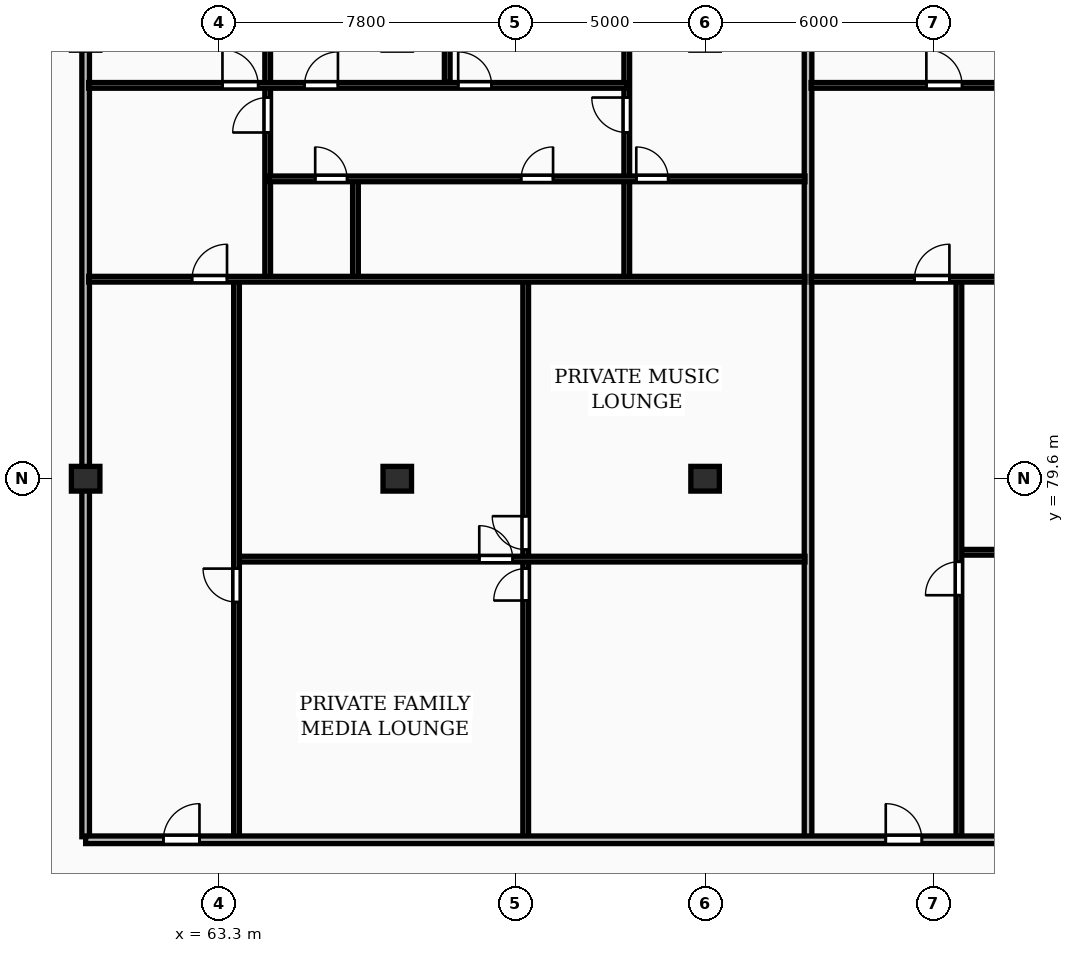
"""IFC4 building model, lengths in metres.
Left out: names, types, materials, properties, quantities, classifications, styles, units other than length and angle.
Written with IfcOpenShell. Run it as: python <this file> out.ifc"""

import sys

from ifc_helpers import new_model, si_unit, direction, frame, frame_2d, origin, origin_2d, place, context, subcontext, project, spatial, rectangle, extrude, element, fill, save


model = new_model("IFC4")
c1 = context("Model", 3, precision=1e-05, world=origin(), true_north=direction((0.0, 1.0)))
c2 = subcontext(c1, "Body", "Model", "MODEL_VIEW")
j1 = project(units=[si_unit("LENGTHUNIT", "METRE"), si_unit("PLANEANGLEUNIT", "RADIAN")], contexts=[c1])
p1 = place(None, origin())
s1 = spatial("IfcSite", under=j1, at=p1, CompositionType="ELEMENT")
p2 = place(p1, origin())
s2 = spatial("IfcBuilding", under=s1, at=p2, CompositionType="ELEMENT")
p3 = place(p2, frame((0.0, 0.0, 256.25)))
s3 = spatial("IfcBuildingStorey", under=s2, at=p3, CompositionType="ELEMENT", Elevation=256.25)
for number, where, z_axis, x_axis in (
    (1, (59.8, 79.6, 0.0), (0.0, 0.0, 1.0), (1.0, 0.0, 0.0)),
    (2, (68.0, 79.6, 0.0), (0.0, 0.0, 1.0), (1.0, 0.0, 0.0)),
    (3, (76.1, 79.6, 0.0), (0.0, 0.0, 1.0), (1.0, 0.0, 0.0)),
):
    element("IfcColumn", number, at=place(p3, frame(where, z_axis=z_axis, x_axis=x_axis)), inside=s3, PredefinedType="COLUMN", context=c2, shape_type="SweptSolid", body=[
        extrude(rectangle(XDim=0.75, YDim=0.65, at=origin_2d()), origin(), (0.0, 0.0, 1.0), 3.45),
    ])
p4 = place(p3, frame((59.8, 70.18, 0.0), z_axis=(0.0, 0.0, 1.0), x_axis=(0.0, 1.0, 0.0)))
e4 = element("IfcWall", 4, at=p4, inside=s3, PredefinedType="PARTITIONING", context=c2, shape_type="SweptSolid", body=[
    extrude(rectangle(XDim=24.32, YDim=0.2, at=frame_2d((12.16, 0.0))), origin(), (0.0, 0.0, 1.0), 2.477),
])
p5 = place(p3, frame((78.809, 70.18, 0.0), z_axis=(0.0, 0.0, 1.0), x_axis=(0.0, 1.0, 0.0)))
e5 = element("IfcWall", 5, at=p5, inside=s3, PredefinedType="PARTITIONING", context=c2, shape_type="SweptSolid", body=[
    extrude(rectangle(XDim=24.32, YDim=0.2, at=frame_2d((12.16, 0.0))), origin(), (0.0, 0.0, 1.0), 3.17),
])
p6 = place(p3, frame((71.379, 70.16, 0.0), z_axis=(0.0, 0.0, 1.0), x_axis=(0.0, 1.0, 0.0)))
e6 = element("IfcWall", 6, at=p6, inside=s3, PredefinedType="PARTITIONING", context=c2, shape_type="SweptSolid", body=[
    extrude(rectangle(XDim=14.65, YDim=0.15, at=frame_2d((7.325, 0.0))), origin(), (0.0, 0.0, 1.0), 3.17),
])
p7 = place(p6, frame((6.235, 0.0, 0.0)))
e7 = element("IfcOpeningElement", 7, at=p7, cuts=e6, PredefinedType="OPENING", context=c2, shape_type="SweptSolid", body=[
    extrude(rectangle(XDim=0.84, YDim=2.04, at=frame_2d((0.42, 1.02))), frame((0.0, 0.085, 0.0), z_axis=(0.0, -1.0, 0.0), x_axis=(1.0, 0.0, 0.0)), (0.0, 0.0, 1.0), 0.17),
])
p8 = place(p6, frame((7.575, 0.0, 0.0)))
e8 = element("IfcOpeningElement", 8, at=p8, cuts=e6, PredefinedType="OPENING", context=c2, shape_type="SweptSolid", body=[
    extrude(rectangle(XDim=0.88, YDim=2.06, at=frame_2d((0.44, 1.03))), frame((0.0, 0.085, 0.0), z_axis=(0.0, -1.0, 0.0), x_axis=(1.0, 0.0, 0.0)), (0.0, 0.0, 1.0), 0.17),
])
p9 = place(p3, frame((63.83, 77.485, 0.0), z_axis=(0.0, 0.0, 1.0), x_axis=(1.0, 0.0, 0.0)))
e9 = element("IfcWall", 9, at=p9, inside=s3, PredefinedType="PARTITIONING", context=c2, shape_type="SweptSolid", body=[
    extrude(rectangle(XDim=14.899, YDim=0.15, at=frame_2d((7.449, 0.0))), origin(), (0.0, 0.0, 1.0), 3.17),
])
p10 = place(p9, frame((6.327, 0.0, 0.0)))
e10 = element("IfcOpeningElement", 10, at=p10, cuts=e9, PredefinedType="OPENING", context=c2, shape_type="SweptSolid", body=[
    extrude(rectangle(XDim=0.88, YDim=2.06, at=frame_2d((0.44, 1.03))), frame((0.0, 0.085, 0.0), z_axis=(0.0, -1.0, 0.0), x_axis=(1.0, 0.0, 0.0)), (0.0, 0.0, 1.0), 0.17),
])
p11 = place(p3, frame((63.77, 70.16, 0.0), z_axis=(0.0, 0.0, 1.0), x_axis=(0.0, 1.0, 0.0)))
e11 = element("IfcWall", 11, at=p11, inside=s3, PredefinedType="PARTITIONING", context=c2, shape_type="SweptSolid", body=[
    extrude(rectangle(XDim=14.65, YDim=0.15, at=frame_2d((7.325, 0.0))), origin(), (0.0, 0.0, 1.0), 3.17),
])
p12 = place(p11, frame((6.195, 0.0, 0.0)))
e12 = element("IfcOpeningElement", 12, at=p12, cuts=e11, PredefinedType="OPENING", context=c2, shape_type="SweptSolid", body=[
    extrude(rectangle(XDim=0.88, YDim=2.06, at=frame_2d((0.44, 1.03))), frame((0.0, 0.085, 0.0), z_axis=(0.0, -1.0, 0.0), x_axis=(1.0, 0.0, 0.0)), (0.0, 0.0, 1.0), 0.17),
])
p13 = place(p3, frame((66.9, 84.89, 0.0), z_axis=(0.0, 0.0, 1.0), x_axis=(0.0, 1.0, 0.0)))
e13 = element("IfcWall", 13, at=p13, inside=s3, PredefinedType="PARTITIONING", context=c2, shape_type="SweptSolid", body=[
    extrude(rectangle(XDim=2.58, YDim=0.15, at=frame_2d((1.29, 0.0))), origin(), (0.0, 0.0, 1.0), 3.17),
])
p14 = place(p3, frame((69.314, 90.03, 0.0), z_axis=(0.0, 0.0, 1.0), x_axis=(0.0, 1.0, 0.0)))
e14 = element("IfcWall", 14, at=p14, inside=s3, PredefinedType="PARTITIONING", context=c2, shape_type="SweptSolid", body=[
    extrude(rectangle(XDim=4.47, YDim=0.15, at=frame_2d((2.235, 0.0))), origin(), (0.0, 0.0, 1.0), 3.17),
])
p15 = place(p3, frame((64.59, 84.89, 0.0), z_axis=(0.0, 0.0, 1.0), x_axis=(0.0, 1.0, 0.0)))
e15 = element("IfcWall", 15, at=p15, inside=s3, PredefinedType="PARTITIONING", context=c2, shape_type="SweptSolid", body=[
    extrude(rectangle(XDim=9.61, YDim=0.15, at=frame_2d((4.805, 0.0))), origin(), (0.0, 0.0, 1.0), 3.17),
])
p16 = place(p15, frame((3.82, 0.0, 0.0)))
e16 = element("IfcOpeningElement", 16, at=p16, cuts=e15, PredefinedType="OPENING", context=c2, shape_type="SweptSolid", body=[
    extrude(rectangle(XDim=0.92, YDim=2.08, at=frame_2d((0.46, 1.04))), frame((0.0, 0.085, 0.0), z_axis=(0.0, -1.0, 0.0), x_axis=(1.0, 0.0, 0.0)), (0.0, 0.0, 1.0), 0.17),
])
p17 = place(p3, frame((74.039, 84.89, 0.0), z_axis=(0.0, 0.0, 1.0), x_axis=(0.0, 1.0, 0.0)))
e17 = element("IfcWall", 17, at=p17, inside=s3, PredefinedType="PARTITIONING", context=c2, shape_type="SweptSolid", body=[
    extrude(rectangle(XDim=2.58, YDim=0.15, at=frame_2d((1.29, 0.0))), origin(), (0.0, 0.0, 1.0), 3.17),
])
p18 = place(p3, frame((74.039, 87.51, 0.0), z_axis=(0.0, 0.0, 1.0), x_axis=(0.0, 1.0, 0.0)))
e18 = element("IfcWall", 18, at=p18, inside=s3, PredefinedType="PARTITIONING", context=c2, shape_type="SweptSolid", body=[
    extrude(rectangle(XDim=6.99, YDim=0.15, at=frame_2d((3.495, 0.0))), origin(), (0.0, 0.0, 1.0), 3.17),
])
p19 = place(p18, frame((1.2, 0.0, 0.0)))
e19 = element("IfcOpeningElement", 19, at=p19, cuts=e18, PredefinedType="OPENING", context=c2, shape_type="SweptSolid", body=[
    extrude(rectangle(XDim=0.92, YDim=2.08, at=frame_2d((0.46, 1.04))), frame((0.0, 0.085, 0.0), z_axis=(0.0, -1.0, 0.0), x_axis=(1.0, 0.0, 0.0)), (0.0, 0.0, 1.0), 0.17),
])
p20 = place(p3, frame((64.63, 87.49, 0.0), z_axis=(0.0, 0.0, 1.0), x_axis=(1.0, 0.0, 0.0)))
e20 = element("IfcWall", 20, at=p20, inside=s3, PredefinedType="PARTITIONING", context=c2, shape_type="SweptSolid", body=[
    extrude(rectangle(XDim=14.099, YDim=0.15, at=frame_2d((7.05, 0.0))), origin(), (0.0, 0.0, 1.0), 3.17),
])
p21 = place(p20, frame((1.21, 0.0, 0.0)))
e21 = element("IfcOpeningElement", 21, at=p21, cuts=e20, PredefinedType="OPENING", context=c2, shape_type="SweptSolid", body=[
    extrude(rectangle(XDim=0.84, YDim=2.04, at=frame_2d((0.42, 1.02))), frame((0.0, 0.085, 0.0), z_axis=(0.0, -1.0, 0.0), x_axis=(1.0, 0.0, 0.0)), (0.0, 0.0, 1.0), 0.17),
])
p22 = place(p20, frame((6.63, 0.0, 0.0)))
e22 = element("IfcOpeningElement", 22, at=p22, cuts=e20, PredefinedType="OPENING", context=c2, shape_type="SweptSolid", body=[
    extrude(rectangle(XDim=0.84, YDim=2.04, at=frame_2d((0.42, 1.02))), frame((0.0, 0.085, 0.0), z_axis=(0.0, -1.0, 0.0), x_axis=(1.0, 0.0, 0.0)), (0.0, 0.0, 1.0), 0.17),
])
p23 = place(p20, frame((9.659, 0.0, 0.0)))
e23 = element("IfcOpeningElement", 23, at=p23, cuts=e20, PredefinedType="OPENING", context=c2, shape_type="SweptSolid", body=[
    extrude(rectangle(XDim=0.84, YDim=2.04, at=frame_2d((0.42, 1.02))), frame((0.0, 0.085, 0.0), z_axis=(0.0, -1.0, 0.0), x_axis=(1.0, 0.0, 0.0)), (0.0, 0.0, 1.0), 0.17),
])
p24 = place(p3, frame((59.88, 84.85, 0.0), z_axis=(0.0, 0.0, 1.0), x_axis=(1.0, 0.0, 0.0)))
e24 = element("IfcWall", 24, at=p24, inside=s3, PredefinedType="PARTITIONING", context=c2, shape_type="SweptSolid", body=[
    extrude(rectangle(XDim=18.849, YDim=0.15, at=frame_2d((9.425, 0.0))), origin(), (0.0, 0.0, 1.0), 3.17),
])
p25 = place(p24, frame((2.72, 0.0, 0.0)))
e25 = element("IfcOpeningElement", 25, at=p25, cuts=e24, PredefinedType="OPENING", context=c2, shape_type="SweptSolid", body=[
    extrude(rectangle(XDim=0.92, YDim=2.08, at=frame_2d((0.46, 1.04))), frame((0.0, 0.085, 0.0), z_axis=(0.0, -1.0, 0.0), x_axis=(1.0, 0.0, 0.0)), (0.0, 0.0, 1.0), 0.17),
])
p26 = place(p3, frame((59.88, 89.95, 0.0), z_axis=(0.0, 0.0, 1.0), x_axis=(1.0, 0.0, 0.0)))
e26 = element("IfcWall", 26, at=p26, inside=s3, PredefinedType="PARTITIONING", context=c2, shape_type="SweptSolid", body=[
    extrude(rectangle(XDim=14.159, YDim=0.15, at=frame_2d((7.08, 0.0))), origin(), (0.0, 0.0, 1.0), 3.17),
])
p27 = place(p26, frame((3.52, 0.0, 0.0)))
e27 = element("IfcOpeningElement", 27, at=p27, cuts=e26, PredefinedType="OPENING", context=c2, shape_type="SweptSolid", body=[
    extrude(rectangle(XDim=0.94, YDim=2.1, at=frame_2d((0.47, 1.05))), frame((0.0, 0.085, 0.0), z_axis=(0.0, -1.0, 0.0), x_axis=(1.0, 0.0, 0.0)), (0.0, 0.0, 1.0), 0.17),
])
p28 = place(p26, frame((5.679, 0.0, 0.0)))
e28 = element("IfcOpeningElement", 28, at=p28, cuts=e26, PredefinedType="OPENING", context=c2, shape_type="SweptSolid", body=[
    extrude(rectangle(XDim=0.88, YDim=2.06, at=frame_2d((0.44, 1.03))), frame((0.0, 0.085, 0.0), z_axis=(0.0, -1.0, 0.0), x_axis=(1.0, 0.0, 0.0)), (0.0, 0.0, 1.0), 0.17),
])
p29 = place(p26, frame((9.723, 0.0, 0.0)))
e29 = element("IfcOpeningElement", 29, at=p29, cuts=e26, PredefinedType="OPENING", context=c2, shape_type="SweptSolid", body=[
    extrude(rectangle(XDim=0.88, YDim=2.06, at=frame_2d((0.44, 1.03))), frame((0.0, 0.085, 0.0), z_axis=(0.0, -1.0, 0.0), x_axis=(1.0, 0.0, 0.0)), (0.0, 0.0, 1.0), 0.17),
])
p30 = place(p3, frame((82.839, 77.665, 0.0), z_axis=(0.0, 0.0, 1.0), x_axis=(1.0, 0.0, 0.0)))
e30 = element("IfcWall", 30, at=p30, inside=s3, PredefinedType="PARTITIONING", context=c2, shape_type="SweptSolid", body=[
    extrude(rectangle(XDim=13.669, YDim=0.15, at=frame_2d((6.835, 0.0))), origin(), (0.0, 0.0, 1.0), 3.17),
])
p31 = place(p30, frame((5.51, 0.0, 0.0)))
e31 = element("IfcOpeningElement", 31, at=p31, cuts=e30, PredefinedType="OPENING", context=c2, shape_type="SweptSolid", body=[
    extrude(rectangle(XDim=0.88, YDim=2.06, at=frame_2d((0.44, 1.03))), frame((0.0, 0.085, 0.0), z_axis=(0.0, -1.0, 0.0), x_axis=(1.0, 0.0, 0.0)), (0.0, 0.0, 1.0), 0.17),
])
p32 = place(p3, frame((82.779, 70.16, 0.0), z_axis=(0.0, 0.0, 1.0), x_axis=(0.0, 1.0, 0.0)))
e32 = element("IfcWall", 32, at=p32, inside=s3, PredefinedType="PARTITIONING", context=c2, shape_type="SweptSolid", body=[
    extrude(rectangle(XDim=14.65, YDim=0.15, at=frame_2d((7.325, 0.0))), origin(), (0.0, 0.0, 1.0), 3.17),
])
p33 = place(p32, frame((6.375, 0.0, 0.0)))
e33 = element("IfcOpeningElement", 33, at=p33, cuts=e32, PredefinedType="OPENING", context=c2, shape_type="SweptSolid", body=[
    extrude(rectangle(XDim=0.88, YDim=2.06, at=frame_2d((0.44, 1.03))), frame((0.0, 0.085, 0.0), z_axis=(0.0, -1.0, 0.0), x_axis=(1.0, 0.0, 0.0)), (0.0, 0.0, 1.0), 0.17),
])
p34 = place(p3, frame((78.889, 84.85, 0.0), z_axis=(0.0, 0.0, 1.0), x_axis=(1.0, 0.0, 0.0)))
e34 = element("IfcWall", 34, at=p34, inside=s3, PredefinedType="PARTITIONING", context=c2, shape_type="SweptSolid", body=[
    extrude(rectangle(XDim=17.619, YDim=0.15, at=frame_2d((8.81, 0.0))), origin(), (0.0, 0.0, 1.0), 3.17),
])
p35 = place(p34, frame((2.72, 0.0, 0.0)))
e35 = element("IfcOpeningElement", 35, at=p35, cuts=e34, PredefinedType="OPENING", context=c2, shape_type="SweptSolid", body=[
    extrude(rectangle(XDim=0.92, YDim=2.08, at=frame_2d((0.46, 1.04))), frame((0.0, 0.085, 0.0), z_axis=(0.0, -1.0, 0.0), x_axis=(1.0, 0.0, 0.0)), (0.0, 0.0, 1.0), 0.17),
])
p36 = place(p3, frame((78.889, 89.95, 0.0), z_axis=(0.0, 0.0, 1.0), x_axis=(1.0, 0.0, 0.0)))
e36 = element("IfcWall", 36, at=p36, inside=s3, PredefinedType="PARTITIONING", context=c2, shape_type="SweptSolid", body=[
    extrude(rectangle(XDim=12.931, YDim=0.15, at=frame_2d((6.465, 0.0))), origin(), (0.0, 0.0, 1.0), 3.17),
])
p37 = place(p36, frame((3.033, 0.0, 0.0)))
e37 = element("IfcOpeningElement", 37, at=p37, cuts=e36, PredefinedType="OPENING", context=c2, shape_type="SweptSolid", body=[
    extrude(rectangle(XDim=0.94, YDim=2.1, at=frame_2d((0.47, 1.05))), frame((0.0, 0.085, 0.0), z_axis=(0.0, -1.0, 0.0), x_axis=(1.0, 0.0, 0.0)), (0.0, 0.0, 1.0), 0.17),
])
p38 = place(p36, frame((7.711, 0.0, 0.0)))
e38 = element("IfcOpeningElement", 38, at=p38, cuts=e36, PredefinedType="OPENING", context=c2, shape_type="SweptSolid", body=[
    extrude(rectangle(XDim=0.88, YDim=2.06, at=frame_2d((0.44, 1.03))), frame((0.0, 0.085, 0.0), z_axis=(0.0, -1.0, 0.0), x_axis=(1.0, 0.0, 0.0)), (0.0, 0.0, 1.0), 0.17),
])
p39 = place(p36, frame((10.431, 0.0, 0.0)))
e39 = element("IfcOpeningElement", 39, at=p39, cuts=e36, PredefinedType="OPENING", context=c2, shape_type="SweptSolid", body=[
    extrude(rectangle(XDim=0.88, YDim=2.06, at=frame_2d((0.44, 1.03))), frame((0.0, 0.085, 0.0), z_axis=(0.0, -1.0, 0.0), x_axis=(1.0, 0.0, 0.0)), (0.0, 0.0, 1.0), 0.17),
])
p40 = place(p3, frame((59.8, 70.1, 0.0), z_axis=(0.0, 0.0, 1.0), x_axis=(1.0, 0.0, 0.0)))
e40 = element("IfcWall", 40, at=p40, inside=s3, PredefinedType="PARTITIONING", context=c2, shape_type="SweptSolid", body=[
    extrude(rectangle(XDim=68.6, YDim=0.2, at=frame_2d((34.3, 0.0))), origin(), (0.0, 0.0, 1.0), 3.17),
])
p41 = place(p40, frame((2.045, 0.0, 0.0)))
e41 = element("IfcOpeningElement", 41, at=p41, cuts=e40, PredefinedType="OPENING", context=c2, shape_type="SweptSolid", body=[
    extrude(rectangle(XDim=0.95, YDim=2.15, at=frame_2d((0.475, 1.075))), frame((0.0, 0.11, 0.0), z_axis=(0.0, -1.0, 0.0), x_axis=(1.0, 0.0, 0.0)), (0.0, 0.0, 1.0), 0.22),
])
p42 = place(p40, frame((21.054, 0.0, 0.0)))
e42 = element("IfcOpeningElement", 42, at=p42, cuts=e40, PredefinedType="OPENING", context=c2, shape_type="SweptSolid", body=[
    extrude(rectangle(XDim=0.95, YDim=2.15, at=frame_2d((0.475, 1.075))), frame((0.0, 0.11, 0.0), z_axis=(0.0, -1.0, 0.0), x_axis=(1.0, 0.0, 0.0)), (0.0, 0.0, 1.0), 0.22),
])
p43 = place(p40, frame((43.434, 0.0, 0.0)))
e43 = element("IfcOpeningElement", 43, at=p43, cuts=e40, PredefinedType="OPENING", context=c2, shape_type="SweptSolid", body=[
    extrude(rectangle(XDim=1.22, YDim=2.18, at=frame_2d((0.61, 1.09))), frame((0.0, 0.11, 0.0), z_axis=(0.0, -1.0, 0.0), x_axis=(1.0, 0.0, 0.0)), (0.0, 0.0, 1.0), 0.22),
])
p44 = place(p40, frame((59.455, 0.0, 0.0)))
e44 = element("IfcOpeningElement", 44, at=p44, cuts=e40, PredefinedType="OPENING", context=c2, shape_type="SweptSolid", body=[
    extrude(rectangle(XDim=1.22, YDim=2.18, at=frame_2d((0.61, 1.09))), frame((0.0, 0.11, 0.0), z_axis=(0.0, -1.0, 0.0), x_axis=(1.0, 0.0, 0.0)), (0.0, 0.0, 1.0), 0.22),
])
p45 = place(p7, origin())
e45 = element("IfcDoor", 45, at=p45, inside=s3, OperationType="SINGLE_SWING_LEFT", PredefinedType="DOOR", context=c2, shape_type="SweptSolid", body=[
    extrude(rectangle(XDim=0.84, YDim=2.04, at=frame_2d((0.42, 1.02))), frame((0.0, 0.025, 0.0), z_axis=(0.0, -1.0, 0.0), x_axis=(1.0, 0.0, 0.0)), (0.0, 0.0, 1.0), 0.05),
])
fill(e7, e45)
p46 = place(p8, origin())
e46 = element("IfcDoor", 46, at=p46, inside=s3, OperationType="SINGLE_SWING_RIGHT", PredefinedType="DOOR", context=c2, shape_type="SweptSolid", body=[
    extrude(rectangle(XDim=0.88, YDim=2.06, at=frame_2d((0.44, 1.03))), frame((0.0, 0.025, 0.0), z_axis=(0.0, -1.0, 0.0), x_axis=(1.0, 0.0, 0.0)), (0.0, 0.0, 1.0), 0.05),
])
fill(e8, e46)
p47 = place(p10, origin())
e47 = element("IfcDoor", 47, at=p47, inside=s3, OperationType="SINGLE_SWING_LEFT", PredefinedType="DOOR", context=c2, shape_type="SweptSolid", body=[
    extrude(rectangle(XDim=0.88, YDim=2.06, at=frame_2d((0.44, 1.03))), frame((0.0, 0.025, 0.0), z_axis=(0.0, -1.0, 0.0), x_axis=(1.0, 0.0, 0.0)), (0.0, 0.0, 1.0), 0.05),
])
fill(e10, e47)
p48 = place(p12, origin())
e48 = element("IfcDoor", 48, at=p48, inside=s3, OperationType="SINGLE_SWING_RIGHT", PredefinedType="DOOR", context=c2, shape_type="SweptSolid", body=[
    extrude(rectangle(XDim=0.88, YDim=2.06, at=frame_2d((0.44, 1.03))), frame((0.0, 0.025, 0.0), z_axis=(0.0, -1.0, 0.0), x_axis=(1.0, 0.0, 0.0)), (0.0, 0.0, 1.0), 0.05),
])
fill(e12, e48)
p49 = place(p16, origin())
e49 = element("IfcDoor", 49, at=p49, inside=s3, OperationType="SINGLE_SWING_LEFT", PredefinedType="DOOR", context=c2, shape_type="SweptSolid", body=[
    extrude(rectangle(XDim=0.92, YDim=2.08, at=frame_2d((0.46, 1.04))), frame((0.0, 0.025, 0.0), z_axis=(0.0, -1.0, 0.0), x_axis=(1.0, 0.0, 0.0)), (0.0, 0.0, 1.0), 0.05),
])
fill(e16, e49)
p50 = place(p19, origin())
e50 = element("IfcDoor", 50, at=p50, inside=s3, OperationType="SINGLE_SWING_RIGHT", PredefinedType="DOOR", context=c2, shape_type="SweptSolid", body=[
    extrude(rectangle(XDim=0.92, YDim=2.08, at=frame_2d((0.46, 1.04))), frame((0.0, 0.025, 0.0), z_axis=(0.0, -1.0, 0.0), x_axis=(1.0, 0.0, 0.0)), (0.0, 0.0, 1.0), 0.05),
])
fill(e19, e50)
p51 = place(p21, origin())
e51 = element("IfcDoor", 51, at=p51, inside=s3, OperationType="SINGLE_SWING_LEFT", PredefinedType="DOOR", context=c2, shape_type="SweptSolid", body=[
    extrude(rectangle(XDim=0.84, YDim=2.04, at=frame_2d((0.42, 1.02))), frame((0.0, 0.025, 0.0), z_axis=(0.0, -1.0, 0.0), x_axis=(1.0, 0.0, 0.0)), (0.0, 0.0, 1.0), 0.05),
])
fill(e21, e51)
p52 = place(p22, origin())
e52 = element("IfcDoor", 52, at=p52, inside=s3, OperationType="SINGLE_SWING_RIGHT", PredefinedType="DOOR", context=c2, shape_type="SweptSolid", body=[
    extrude(rectangle(XDim=0.84, YDim=2.04, at=frame_2d((0.42, 1.02))), frame((0.0, 0.025, 0.0), z_axis=(0.0, -1.0, 0.0), x_axis=(1.0, 0.0, 0.0)), (0.0, 0.0, 1.0), 0.05),
])
fill(e22, e52)
p53 = place(p23, origin())
e53 = element("IfcDoor", 53, at=p53, inside=s3, OperationType="SINGLE_SWING_LEFT", PredefinedType="DOOR", context=c2, shape_type="SweptSolid", body=[
    extrude(rectangle(XDim=0.84, YDim=2.04, at=frame_2d((0.42, 1.02))), frame((0.0, 0.025, 0.0), z_axis=(0.0, -1.0, 0.0), x_axis=(1.0, 0.0, 0.0)), (0.0, 0.0, 1.0), 0.05),
])
fill(e23, e53)
p54 = place(p25, origin())
e54 = element("IfcDoor", 54, at=p54, inside=s3, OperationType="SINGLE_SWING_RIGHT", PredefinedType="DOOR", context=c2, shape_type="SweptSolid", body=[
    extrude(rectangle(XDim=0.92, YDim=2.08, at=frame_2d((0.46, 1.04))), frame((0.0, 0.025, 0.0), z_axis=(0.0, -1.0, 0.0), x_axis=(1.0, 0.0, 0.0)), (0.0, 0.0, 1.0), 0.05),
])
fill(e25, e54)
p55 = place(p27, origin())
e55 = element("IfcDoor", 55, at=p55, inside=s3, OperationType="SINGLE_SWING_LEFT", PredefinedType="DOOR", context=c2, shape_type="SweptSolid", body=[
    extrude(rectangle(XDim=0.94, YDim=2.1, at=frame_2d((0.47, 1.05))), frame((0.0, 0.025, 0.0), z_axis=(0.0, -1.0, 0.0), x_axis=(1.0, 0.0, 0.0)), (0.0, 0.0, 1.0), 0.05),
])
fill(e27, e55)
p56 = place(p28, origin())
e56 = element("IfcDoor", 56, at=p56, inside=s3, OperationType="SINGLE_SWING_RIGHT", PredefinedType="DOOR", context=c2, shape_type="SweptSolid", body=[
    extrude(rectangle(XDim=0.88, YDim=2.06, at=frame_2d((0.44, 1.03))), frame((0.0, 0.025, 0.0), z_axis=(0.0, -1.0, 0.0), x_axis=(1.0, 0.0, 0.0)), (0.0, 0.0, 1.0), 0.05),
])
fill(e28, e56)
p57 = place(p29, origin())
e57 = element("IfcDoor", 57, at=p57, inside=s3, OperationType="SINGLE_SWING_LEFT", PredefinedType="DOOR", context=c2, shape_type="SweptSolid", body=[
    extrude(rectangle(XDim=0.88, YDim=2.06, at=frame_2d((0.44, 1.03))), frame((0.0, 0.025, 0.0), z_axis=(0.0, -1.0, 0.0), x_axis=(1.0, 0.0, 0.0)), (0.0, 0.0, 1.0), 0.05),
])
fill(e29, e57)
p58 = place(p33, origin())
e58 = element("IfcDoor", 58, at=p58, inside=s3, OperationType="SINGLE_SWING_LEFT", PredefinedType="DOOR", context=c2, shape_type="SweptSolid", body=[
    extrude(rectangle(XDim=0.88, YDim=2.06, at=frame_2d((0.44, 1.03))), frame((0.0, 0.025, 0.0), z_axis=(0.0, -1.0, 0.0), x_axis=(1.0, 0.0, 0.0)), (0.0, 0.0, 1.0), 0.05),
])
fill(e33, e58)
p59 = place(p35, origin())
e59 = element("IfcDoor", 59, at=p59, inside=s3, OperationType="SINGLE_SWING_RIGHT", PredefinedType="DOOR", context=c2, shape_type="SweptSolid", body=[
    extrude(rectangle(XDim=0.92, YDim=2.08, at=frame_2d((0.46, 1.04))), frame((0.0, 0.025, 0.0), z_axis=(0.0, -1.0, 0.0), x_axis=(1.0, 0.0, 0.0)), (0.0, 0.0, 1.0), 0.05),
])
fill(e35, e59)
p60 = place(p37, origin())
e60 = element("IfcDoor", 60, at=p60, inside=s3, OperationType="SINGLE_SWING_LEFT", PredefinedType="DOOR", context=c2, shape_type="SweptSolid", body=[
    extrude(rectangle(XDim=0.94, YDim=2.1, at=frame_2d((0.47, 1.05))), frame((0.0, 0.025, 0.0), z_axis=(0.0, -1.0, 0.0), x_axis=(1.0, 0.0, 0.0)), (0.0, 0.0, 1.0), 0.05),
])
fill(e37, e60)
p61 = place(p41, origin())
e61 = element("IfcDoor", 61, at=p61, inside=s3, OperationType="SINGLE_SWING_RIGHT", PredefinedType="DOOR", context=c2, shape_type="SweptSolid", body=[
    extrude(rectangle(XDim=0.95, YDim=2.15, at=frame_2d((0.475, 1.075))), frame((0.0, 0.025, 0.0), z_axis=(0.0, -1.0, 0.0), x_axis=(1.0, 0.0, 0.0)), (0.0, 0.0, 1.0), 0.05),
])
fill(e41, e61)
p62 = place(p42, origin())
e62 = element("IfcDoor", 62, at=p62, inside=s3, OperationType="SINGLE_SWING_LEFT", PredefinedType="DOOR", context=c2, shape_type="SweptSolid", body=[
    extrude(rectangle(XDim=0.95, YDim=2.15, at=frame_2d((0.475, 1.075))), frame((0.0, 0.025, 0.0), z_axis=(0.0, -1.0, 0.0), x_axis=(1.0, 0.0, 0.0)), (0.0, 0.0, 1.0), 0.05),
])
fill(e42, e62)
save(model, sys.argv[1])
